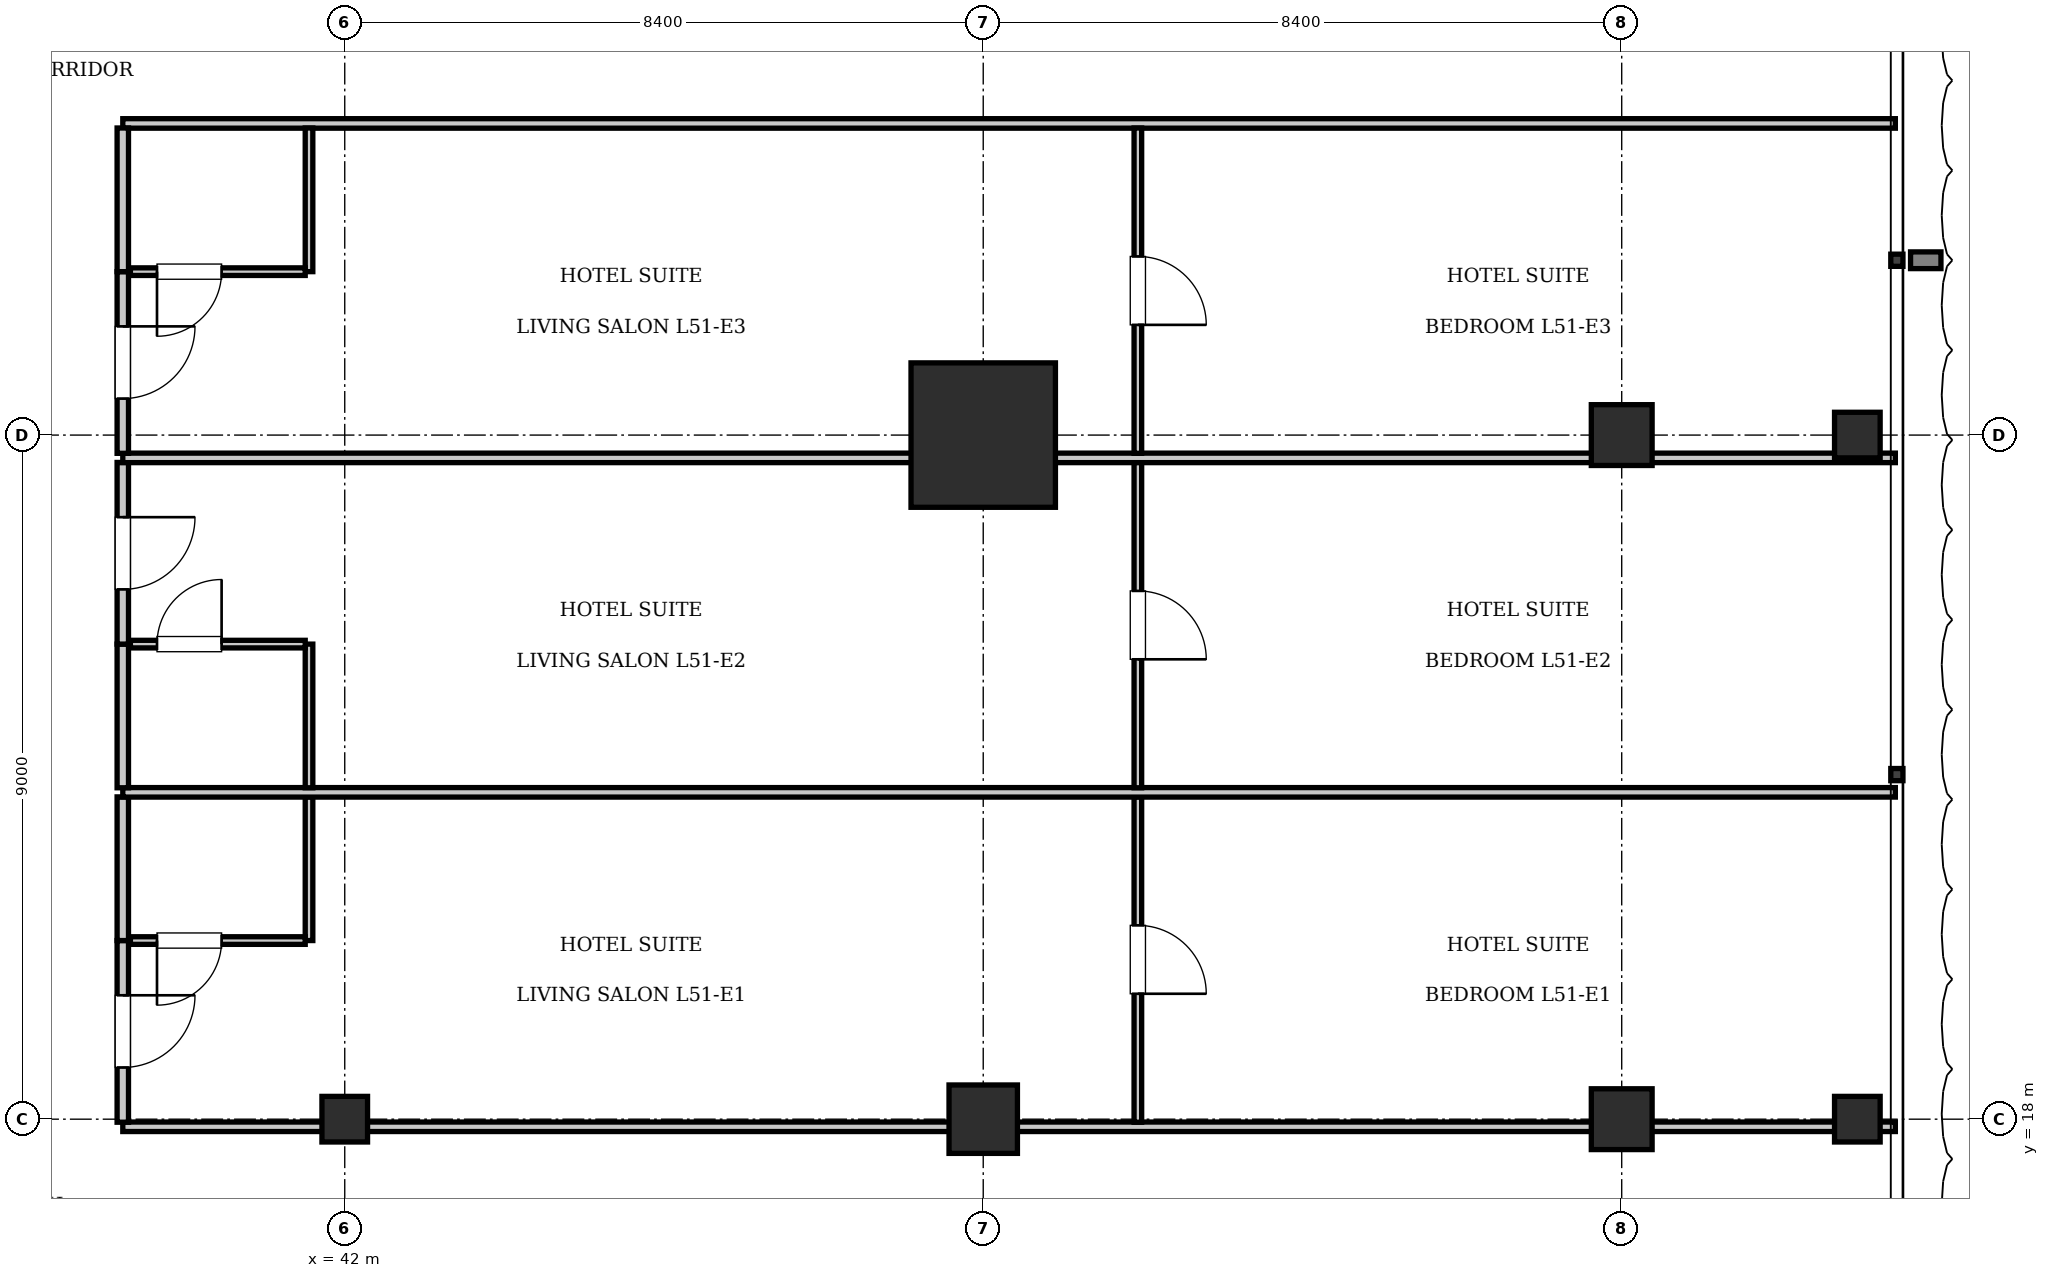
"""IFC4 building model, lengths in metres.
Left out: names, types, materials, properties, quantities, classifications, styles, units other than length and angle.
Written with IfcOpenShell. Run it as: python <this file> out.ifc"""

import sys

from ifc_helpers import new_model, si_unit, direction, frame, frame_2d, origin, origin_2d, place, context, subcontext, project, spatial, rectangle, i_section, extrude, element, fill, save


model = new_model("IFC4")
c1 = context("Model", 3, precision=1e-05, world=origin(), true_north=direction((0.0, 1.0)))
c2 = subcontext(c1, "Body", "Model", "MODEL_VIEW")
j1 = project(units=[si_unit("LENGTHUNIT", "METRE"), si_unit("PLANEANGLEUNIT", "RADIAN")], contexts=[c1])
p1 = place(None, origin())
s1 = spatial("IfcSite", under=j1, at=p1, CompositionType="ELEMENT")
p2 = place(p1, origin())
s2 = spatial("IfcBuilding", under=s1, at=p2, CompositionType="ELEMENT")
p3 = place(p2, frame((0.0, 0.0, 208.25)))
s3 = spatial("IfcBuildingStorey", under=s2, at=p3, CompositionType="ELEMENT", Elevation=208.25)
p4 = place(p3, frame((50.4, 27.0, 0.0), z_axis=(0.0, 0.0, 1.0), x_axis=(1.0, 0.0, 0.0)))
e1 = element("IfcColumn", 1, at=p4, inside=s3, PredefinedType="COLUMN", context=c2, shape_type="SweptSolid", body=[
    extrude(rectangle(XDim=1.9, YDim=1.9, at=origin_2d()), origin(), (0.0, 0.0, 1.0), 3.85),
])
p5 = place(p3, frame((50.4, 18.0, 0.0), z_axis=(0.0, 0.0, 1.0), x_axis=(1.0, 0.0, 0.0)))
e2 = element("IfcColumn", 2, at=p5, inside=s3, PredefinedType="COLUMN", context=c2, shape_type="SweptSolid", body=[
    extrude(rectangle(XDim=0.9, YDim=0.9, at=origin_2d()), origin(), (0.0, 0.0, 1.0), 3.85),
])
p6 = place(p3, frame((42.0, 18.0, 0.0), z_axis=(0.0, 0.0, 1.0), x_axis=(1.0, 0.0, 0.0)))
e3 = element("IfcColumn", 3, at=p6, inside=s3, PredefinedType="COLUMN", context=c2, shape_type="SweptSolid", body=[
    extrude(i_section(OverallWidth=0.6, OverallDepth=0.6, WebThickness=0.025, FlangeThickness=0.038, at=origin_2d()), origin(), (0.0, 0.0, 1.0), 3.85),
])
for number, where, z_axis, x_axis in (
    (4, (58.8, 18.0, 0.0), (0.0, 0.0, 1.0), (1.0, 0.0, 0.0)),
    (5, (58.8, 27.0, 0.0), (0.0, 0.0, 1.0), (1.0, 0.0, 0.0)),
):
    element("IfcColumn", number, at=place(p3, frame(where, z_axis=z_axis, x_axis=x_axis)), inside=s3, PredefinedType="COLUMN", context=c2, shape_type="SweptSolid", body=[
        extrude(rectangle(XDim=0.8, YDim=0.8, at=origin_2d()), origin(), (0.0, 0.0, 1.0), 3.85),
    ])
for number, where, z_axis, x_axis in (
    (6, (61.9, 18.0, 0.0), (0.0, 0.0, 1.0), (1.0, 0.0, 0.0)),
    (7, (61.9, 27.0, 0.0), (0.0, 0.0, 1.0), (1.0, 0.0, 0.0)),
):
    element("IfcColumn", number, at=place(p3, frame(where, z_axis=z_axis, x_axis=x_axis)), inside=s3, PredefinedType="COLUMN", context=c2, shape_type="SweptSolid", body=[
        extrude(i_section(OverallWidth=0.6, OverallDepth=0.6, WebThickness=0.025, FlangeThickness=0.038, at=origin_2d()), origin(), (0.0, 0.0, 1.0), 3.85),
    ])
p7 = place(p3, frame((39.08, 17.9, 0.0), z_axis=(0.0, 0.0, 1.0), x_axis=(1.0, 0.0, 0.0)))
e8 = element("IfcWall", 8, at=p7, inside=s3, PredefinedType="PARTITIONING", context=c2, shape_type="SweptSolid", body=[
    extrude(rectangle(XDim=23.32, YDim=0.125, at=frame_2d((11.66, 0.0))), origin(), (0.0, 0.0, 1.0), 3.071),
])
p8 = place(p3, frame((39.08, 31.1, 0.0), z_axis=(0.0, 0.0, 1.0), x_axis=(1.0, 0.0, 0.0)))
e9 = element("IfcWall", 9, at=p8, inside=s3, PredefinedType="PARTITIONING", context=c2, shape_type="SweptSolid", body=[
    extrude(rectangle(XDim=23.32, YDim=0.125, at=frame_2d((11.66, 0.0))), origin(), (0.0, 0.0, 1.0), 3.61),
])
p9 = place(p3, frame((39.08, 17.96, 0.0), z_axis=(0.0, 0.0, 1.0), x_axis=(0.0, 1.0, 0.0)))
e10 = element("IfcWall", 10, at=p9, inside=s3, PredefinedType="PARTITIONING", context=c2, shape_type="SweptSolid", body=[
    extrude(rectangle(XDim=2.39, YDim=0.15, at=frame_2d((1.195, 0.0))), origin(), (0.0, 0.0, 1.0), 3.61),
])
p10 = place(p9, frame((0.72, 0.0, 0.0)))
e11 = element("IfcOpeningElement", 11, at=p10, cuts=e10, PredefinedType="OPENING", context=c2, shape_type="SweptSolid", body=[
    extrude(rectangle(XDim=0.95, YDim=2.15, at=frame_2d((0.475, 1.075))), frame((0.0, 0.085, 0.0), z_axis=(0.0, -1.0, 0.0), x_axis=(1.0, 0.0, 0.0)), (0.0, 0.0, 1.0), 0.17),
])
p11 = place(p3, frame((39.08, 20.35, 0.0), z_axis=(0.0, 0.0, 1.0), x_axis=(0.0, 1.0, 0.0)))
e12 = element("IfcWall", 12, at=p11, inside=s3, PredefinedType="PARTITIONING", context=c2, shape_type="SweptSolid", body=[
    extrude(rectangle(XDim=1.89, YDim=0.15, at=frame_2d((0.945, 0.0))), origin(), (0.0, 0.0, 1.0), 3.61),
])
p12 = place(p3, frame((41.53, 20.35, 0.0), z_axis=(0.0, 0.0, 1.0), x_axis=(0.0, 1.0, 0.0)))
e13 = element("IfcWall", 13, at=p12, inside=s3, PredefinedType="PARTITIONING", context=c2, shape_type="SweptSolid", body=[
    extrude(rectangle(XDim=1.89, YDim=0.1, at=frame_2d((0.945, 0.0))), origin(), (0.0, 0.0, 1.0), 3.61),
])
p13 = place(p3, frame((39.18, 20.35, 0.0), z_axis=(0.0, 0.0, 1.0), x_axis=(1.0, 0.0, 0.0)))
e14 = element("IfcWall", 14, at=p13, inside=s3, PredefinedType="PARTITIONING", context=c2, shape_type="SweptSolid", body=[
    extrude(rectangle(XDim=2.3, YDim=0.1, at=frame_2d((1.15, 0.0))), origin(), (0.0, 0.0, 1.0), 3.61),
])
p14 = place(p13, frame((0.35, 0.0, 0.0)))
e15 = element("IfcOpeningElement", 15, at=p14, cuts=e14, PredefinedType="OPENING", context=c2, shape_type="SweptSolid", body=[
    extrude(rectangle(XDim=0.85, YDim=2.1, at=frame_2d((0.425, 1.05))), frame((0.0, 0.06, 0.0), z_axis=(0.0, -1.0, 0.0), x_axis=(1.0, 0.0, 0.0)), (0.0, 0.0, 1.0), 0.12),
])
p15 = place(p3, frame((52.434, 17.96, 0.0), z_axis=(0.0, 0.0, 1.0), x_axis=(0.0, 1.0, 0.0)))
e16 = element("IfcWall", 16, at=p15, inside=s3, PredefinedType="PARTITIONING", context=c2, shape_type="SweptSolid", body=[
    extrude(rectangle(XDim=4.28, YDim=0.1, at=frame_2d((2.14, 0.0))), origin(), (0.0, 0.0, 1.0), 3.61),
])
p16 = place(p15, frame((1.69, 0.0, 0.0)))
e17 = element("IfcOpeningElement", 17, at=p16, cuts=e16, PredefinedType="OPENING", context=c2, shape_type="SweptSolid", body=[
    extrude(rectangle(XDim=0.9, YDim=2.1, at=frame_2d((0.45, 1.05))), frame((0.0, 0.06, 0.0), z_axis=(0.0, -1.0, 0.0), x_axis=(1.0, 0.0, 0.0)), (0.0, 0.0, 1.0), 0.12),
])
p17 = place(p3, frame((39.08, 22.3, 0.0), z_axis=(0.0, 0.0, 1.0), x_axis=(1.0, 0.0, 0.0)))
e18 = element("IfcWall", 18, at=p17, inside=s3, PredefinedType="PARTITIONING", context=c2, shape_type="SweptSolid", body=[
    extrude(rectangle(XDim=23.32, YDim=0.125, at=frame_2d((11.66, 0.0))), origin(), (0.0, 0.0, 1.0), 3.61),
])
p18 = place(p3, frame((39.08, 22.36, 0.0), z_axis=(0.0, 0.0, 1.0), x_axis=(0.0, 1.0, 0.0)))
e19 = element("IfcWall", 19, at=p18, inside=s3, PredefinedType="PARTITIONING", context=c2, shape_type="SweptSolid", body=[
    extrude(rectangle(XDim=1.89, YDim=0.15, at=frame_2d((0.945, 0.0))), origin(), (0.0, 0.0, 1.0), 3.61),
])
p19 = place(p3, frame((39.08, 24.25, 0.0), z_axis=(0.0, 0.0, 1.0), x_axis=(0.0, 1.0, 0.0)))
e20 = element("IfcWall", 20, at=p19, inside=s3, PredefinedType="PARTITIONING", context=c2, shape_type="SweptSolid", body=[
    extrude(rectangle(XDim=2.39, YDim=0.15, at=frame_2d((1.195, 0.0))), origin(), (0.0, 0.0, 1.0), 3.61),
])
p20 = place(p19, frame((0.72, 0.0, 0.0)))
e21 = element("IfcOpeningElement", 21, at=p20, cuts=e20, PredefinedType="OPENING", context=c2, shape_type="SweptSolid", body=[
    extrude(rectangle(XDim=0.95, YDim=2.15, at=frame_2d((0.475, 1.075))), frame((0.0, 0.085, 0.0), z_axis=(0.0, -1.0, 0.0), x_axis=(1.0, 0.0, 0.0)), (0.0, 0.0, 1.0), 0.17),
])
p21 = place(p3, frame((41.53, 22.36, 0.0), z_axis=(0.0, 0.0, 1.0), x_axis=(0.0, 1.0, 0.0)))
e22 = element("IfcWall", 22, at=p21, inside=s3, PredefinedType="PARTITIONING", context=c2, shape_type="SweptSolid", body=[
    extrude(rectangle(XDim=1.89, YDim=0.1, at=frame_2d((0.945, 0.0))), origin(), (0.0, 0.0, 1.0), 3.61),
])
p22 = place(p3, frame((39.18, 24.25, 0.0), z_axis=(0.0, 0.0, 1.0), x_axis=(1.0, 0.0, 0.0)))
e23 = element("IfcWall", 23, at=p22, inside=s3, PredefinedType="PARTITIONING", context=c2, shape_type="SweptSolid", body=[
    extrude(rectangle(XDim=2.3, YDim=0.1, at=frame_2d((1.15, 0.0))), origin(), (0.0, 0.0, 1.0), 3.61),
])
p23 = place(p22, frame((0.35, 0.0, 0.0)))
e24 = element("IfcOpeningElement", 24, at=p23, cuts=e23, PredefinedType="OPENING", context=c2, shape_type="SweptSolid", body=[
    extrude(rectangle(XDim=0.85, YDim=2.1, at=frame_2d((0.425, 1.05))), frame((0.0, 0.06, 0.0), z_axis=(0.0, -1.0, 0.0), x_axis=(1.0, 0.0, 0.0)), (0.0, 0.0, 1.0), 0.12),
])
p24 = place(p3, frame((52.434, 22.36, 0.0), z_axis=(0.0, 0.0, 1.0), x_axis=(0.0, 1.0, 0.0)))
e25 = element("IfcWall", 25, at=p24, inside=s3, PredefinedType="PARTITIONING", context=c2, shape_type="SweptSolid", body=[
    extrude(rectangle(XDim=4.28, YDim=0.1, at=frame_2d((2.14, 0.0))), origin(), (0.0, 0.0, 1.0), 3.61),
])
p25 = place(p24, frame((1.69, 0.0, 0.0)))
e26 = element("IfcOpeningElement", 26, at=p25, cuts=e25, PredefinedType="OPENING", context=c2, shape_type="SweptSolid", body=[
    extrude(rectangle(XDim=0.9, YDim=2.1, at=frame_2d((0.45, 1.05))), frame((0.0, 0.06, 0.0), z_axis=(0.0, -1.0, 0.0), x_axis=(1.0, 0.0, 0.0)), (0.0, 0.0, 1.0), 0.12),
])
p26 = place(p3, frame((39.08, 26.7, 0.0), z_axis=(0.0, 0.0, 1.0), x_axis=(1.0, 0.0, 0.0)))
e27 = element("IfcWall", 27, at=p26, inside=s3, PredefinedType="PARTITIONING", context=c2, shape_type="SweptSolid", body=[
    extrude(rectangle(XDim=23.32, YDim=0.125, at=frame_2d((11.66, 0.0))), origin(), (0.0, 0.0, 1.0), 3.61),
])
p27 = place(p3, frame((39.08, 26.76, 0.0), z_axis=(0.0, 0.0, 1.0), x_axis=(0.0, 1.0, 0.0)))
e28 = element("IfcWall", 28, at=p27, inside=s3, PredefinedType="PARTITIONING", context=c2, shape_type="SweptSolid", body=[
    extrude(rectangle(XDim=2.39, YDim=0.15, at=frame_2d((1.195, 0.0))), origin(), (0.0, 0.0, 1.0), 3.61),
])
p28 = place(p27, frame((0.72, 0.0, 0.0)))
e29 = element("IfcOpeningElement", 29, at=p28, cuts=e28, PredefinedType="OPENING", context=c2, shape_type="SweptSolid", body=[
    extrude(rectangle(XDim=0.95, YDim=2.15, at=frame_2d((0.475, 1.075))), frame((0.0, 0.085, 0.0), z_axis=(0.0, -1.0, 0.0), x_axis=(1.0, 0.0, 0.0)), (0.0, 0.0, 1.0), 0.17),
])
p29 = place(p3, frame((39.08, 29.15, 0.0), z_axis=(0.0, 0.0, 1.0), x_axis=(0.0, 1.0, 0.0)))
e30 = element("IfcWall", 30, at=p29, inside=s3, PredefinedType="PARTITIONING", context=c2, shape_type="SweptSolid", body=[
    extrude(rectangle(XDim=1.89, YDim=0.15, at=frame_2d((0.945, 0.0))), origin(), (0.0, 0.0, 1.0), 3.61),
])
p30 = place(p3, frame((41.53, 29.15, 0.0), z_axis=(0.0, 0.0, 1.0), x_axis=(0.0, 1.0, 0.0)))
e31 = element("IfcWall", 31, at=p30, inside=s3, PredefinedType="PARTITIONING", context=c2, shape_type="SweptSolid", body=[
    extrude(rectangle(XDim=1.89, YDim=0.1, at=frame_2d((0.945, 0.0))), origin(), (0.0, 0.0, 1.0), 3.61),
])
p31 = place(p3, frame((39.18, 29.15, 0.0), z_axis=(0.0, 0.0, 1.0), x_axis=(1.0, 0.0, 0.0)))
e32 = element("IfcWall", 32, at=p31, inside=s3, PredefinedType="PARTITIONING", context=c2, shape_type="SweptSolid", body=[
    extrude(rectangle(XDim=2.3, YDim=0.1, at=frame_2d((1.15, 0.0))), origin(), (0.0, 0.0, 1.0), 3.61),
])
p32 = place(p31, frame((0.35, 0.0, 0.0)))
e33 = element("IfcOpeningElement", 33, at=p32, cuts=e32, PredefinedType="OPENING", context=c2, shape_type="SweptSolid", body=[
    extrude(rectangle(XDim=0.85, YDim=2.1, at=frame_2d((0.425, 1.05))), frame((0.0, 0.06, 0.0), z_axis=(0.0, -1.0, 0.0), x_axis=(1.0, 0.0, 0.0)), (0.0, 0.0, 1.0), 0.12),
])
p33 = place(p3, frame((52.434, 26.76, 0.0), z_axis=(0.0, 0.0, 1.0), x_axis=(0.0, 1.0, 0.0)))
e34 = element("IfcWall", 34, at=p33, inside=s3, PredefinedType="PARTITIONING", context=c2, shape_type="SweptSolid", body=[
    extrude(rectangle(XDim=4.28, YDim=0.1, at=frame_2d((2.14, 0.0))), origin(), (0.0, 0.0, 1.0), 3.61),
])
p34 = place(p33, frame((1.69, 0.0, 0.0)))
e35 = element("IfcOpeningElement", 35, at=p34, cuts=e34, PredefinedType="OPENING", context=c2, shape_type="SweptSolid", body=[
    extrude(rectangle(XDim=0.9, YDim=2.1, at=frame_2d((0.45, 1.05))), frame((0.0, 0.06, 0.0), z_axis=(0.0, -1.0, 0.0), x_axis=(1.0, 0.0, 0.0)), (0.0, 0.0, 1.0), 0.12),
])
p35 = place(p14, frame((0.85, 0.0, 0.0), z_axis=(0.0, 0.0, 1.0), x_axis=(-1.0, 0.0, 0.0)))
e36 = element("IfcDoor", 36, at=p35, inside=s3, OperationType="SINGLE_SWING_RIGHT", PredefinedType="DOOR", context=c2, shape_type="SweptSolid", body=[
    extrude(rectangle(XDim=0.85, YDim=2.1, at=frame_2d((0.425, 1.05))), frame((0.0, 0.025, 0.0), z_axis=(0.0, -1.0, 0.0), x_axis=(1.0, 0.0, 0.0)), (0.0, 0.0, 1.0), 0.05),
])
fill(e15, e36)
p36 = place(p10, frame((0.95, 0.0, 0.0), z_axis=(0.0, 0.0, 1.0), x_axis=(-1.0, 0.0, 0.0)))
e37 = element("IfcDoor", 37, at=p36, inside=s3, OperationType="SINGLE_SWING_LEFT", PredefinedType="DOOR", context=c2, shape_type="SweptSolid", body=[
    extrude(rectangle(XDim=0.95, YDim=2.15, at=frame_2d((0.475, 1.075))), frame((0.0, 0.025, 0.0), z_axis=(0.0, -1.0, 0.0), x_axis=(1.0, 0.0, 0.0)), (0.0, 0.0, 1.0), 0.05),
])
fill(e11, e37)
p37 = place(p16, frame((0.9, 0.0, 0.0), z_axis=(0.0, 0.0, 1.0), x_axis=(-1.0, 0.0, 0.0)))
e38 = element("IfcDoor", 38, at=p37, inside=s3, OperationType="SINGLE_SWING_RIGHT", PredefinedType="DOOR", context=c2, shape_type="SweptSolid", body=[
    extrude(rectangle(XDim=0.9, YDim=2.1, at=frame_2d((0.45, 1.05))), frame((0.0, 0.025, 0.0), z_axis=(0.0, -1.0, 0.0), x_axis=(1.0, 0.0, 0.0)), (0.0, 0.0, 1.0), 0.05),
])
fill(e17, e38)
p38 = place(p23, origin())
e39 = element("IfcDoor", 39, at=p38, inside=s3, OperationType="SINGLE_SWING_RIGHT", PredefinedType="DOOR", context=c2, shape_type="SweptSolid", body=[
    extrude(rectangle(XDim=0.85, YDim=2.1, at=frame_2d((0.425, 1.05))), frame((0.0, 0.025, 0.0), z_axis=(0.0, -1.0, 0.0), x_axis=(1.0, 0.0, 0.0)), (0.0, 0.0, 1.0), 0.05),
])
fill(e24, e39)
p39 = place(p20, frame((0.95, 0.0, 0.0), z_axis=(0.0, 0.0, 1.0), x_axis=(-1.0, 0.0, 0.0)))
e40 = element("IfcDoor", 40, at=p39, inside=s3, OperationType="SINGLE_SWING_LEFT", PredefinedType="DOOR", context=c2, shape_type="SweptSolid", body=[
    extrude(rectangle(XDim=0.95, YDim=2.15, at=frame_2d((0.475, 1.075))), frame((0.0, 0.025, 0.0), z_axis=(0.0, -1.0, 0.0), x_axis=(1.0, 0.0, 0.0)), (0.0, 0.0, 1.0), 0.05),
])
fill(e21, e40)
p40 = place(p25, frame((0.9, 0.0, 0.0), z_axis=(0.0, 0.0, 1.0), x_axis=(-1.0, 0.0, 0.0)))
e41 = element("IfcDoor", 41, at=p40, inside=s3, OperationType="SINGLE_SWING_RIGHT", PredefinedType="DOOR", context=c2, shape_type="SweptSolid", body=[
    extrude(rectangle(XDim=0.9, YDim=2.1, at=frame_2d((0.45, 1.05))), frame((0.0, 0.025, 0.0), z_axis=(0.0, -1.0, 0.0), x_axis=(1.0, 0.0, 0.0)), (0.0, 0.0, 1.0), 0.05),
])
fill(e26, e41)
p41 = place(p32, frame((0.85, 0.0, 0.0), z_axis=(0.0, 0.0, 1.0), x_axis=(-1.0, 0.0, 0.0)))
e42 = element("IfcDoor", 42, at=p41, inside=s3, OperationType="SINGLE_SWING_RIGHT", PredefinedType="DOOR", context=c2, shape_type="SweptSolid", body=[
    extrude(rectangle(XDim=0.85, YDim=2.1, at=frame_2d((0.425, 1.05))), frame((0.0, 0.025, 0.0), z_axis=(0.0, -1.0, 0.0), x_axis=(1.0, 0.0, 0.0)), (0.0, 0.0, 1.0), 0.05),
])
fill(e33, e42)
p42 = place(p28, frame((0.95, 0.0, 0.0), z_axis=(0.0, 0.0, 1.0), x_axis=(-1.0, 0.0, 0.0)))
e43 = element("IfcDoor", 43, at=p42, inside=s3, OperationType="SINGLE_SWING_LEFT", PredefinedType="DOOR", context=c2, shape_type="SweptSolid", body=[
    extrude(rectangle(XDim=0.95, YDim=2.15, at=frame_2d((0.475, 1.075))), frame((0.0, 0.025, 0.0), z_axis=(0.0, -1.0, 0.0), x_axis=(1.0, 0.0, 0.0)), (0.0, 0.0, 1.0), 0.05),
])
fill(e29, e43)
p43 = place(p34, frame((0.9, 0.0, 0.0), z_axis=(0.0, 0.0, 1.0), x_axis=(-1.0, 0.0, 0.0)))
e44 = element("IfcDoor", 44, at=p43, inside=s3, OperationType="SINGLE_SWING_RIGHT", PredefinedType="DOOR", context=c2, shape_type="SweptSolid", body=[
    extrude(rectangle(XDim=0.9, YDim=2.1, at=frame_2d((0.45, 1.05))), frame((0.0, 0.025, 0.0), z_axis=(0.0, -1.0, 0.0), x_axis=(1.0, 0.0, 0.0)), (0.0, 0.0, 1.0), 0.05),
])
fill(e35, e44)
save(model, sys.argv[1])
